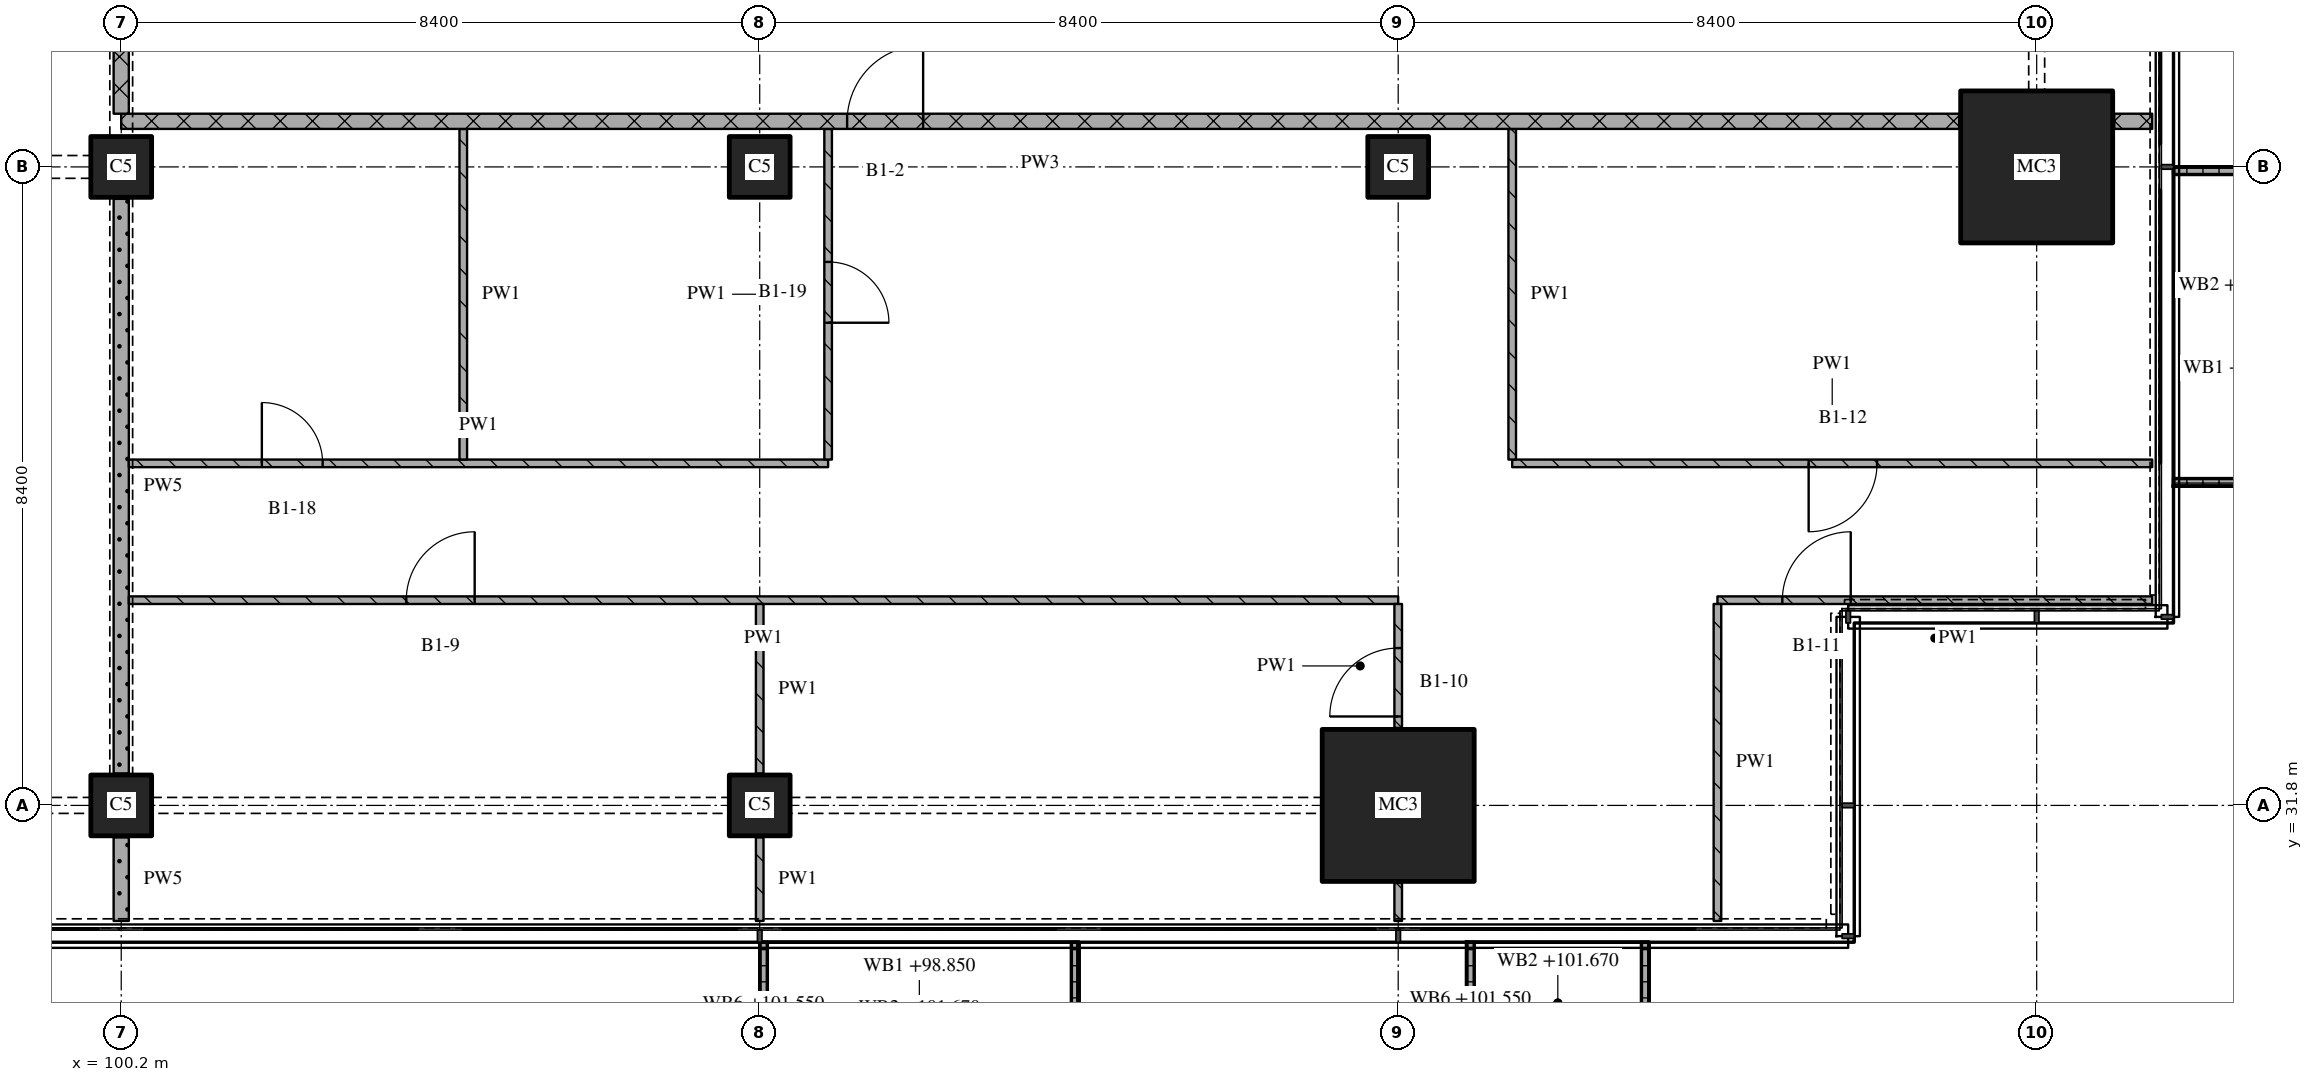
"""IFC4 building model, lengths in metres.
Left out: names, types, materials, properties, quantities, classifications, styles, units other than length and angle.
Written with IfcOpenShell. Run it as: python <this file> out.ifc"""

import sys

from ifc_helpers import new_model, si_unit, direction, frame, frame_2d, origin, origin_2d, place, context, subcontext, project, spatial, polyline, rectangle, outline, extrude, element, fill, save


model = new_model("IFC4")
c1 = context("Model", 3, precision=1e-05, world=origin(), true_north=direction((0.0, 1.0)))
c2 = subcontext(c1, "Body", "Model", "MODEL_VIEW")
j1 = project(units=[si_unit("LENGTHUNIT", "METRE"), si_unit("PLANEANGLEUNIT", "RADIAN")], contexts=[c1])
p1 = place(None, origin())
s1 = spatial("IfcSite", under=j1, at=p1, CompositionType="ELEMENT")
p2 = place(p1, origin())
s2 = spatial("IfcBuilding", under=s1, at=p2, CompositionType="ELEMENT")
p3 = place(p2, frame((0.0, 0.0, 98.85)))
s3 = spatial("IfcBuildingStorey", under=s2, at=p3, CompositionType="ELEMENT", Elevation=98.85)
for number, where, z_axis, x_axis in (
    (1, (100.2, 31.8, 0.0), (0.0, 0.0, 1.0), (1.0, 0.0, 0.0)),
    (2, (100.2, 40.2, 0.0), (0.0, 0.0, 1.0), (1.0, 0.0, 0.0)),
    (3, (108.6, 31.8, 0.0), (0.0, 0.0, 1.0), (1.0, 0.0, 0.0)),
    (4, (108.6, 40.2, 0.0), (0.0, 0.0, 1.0), (1.0, 0.0, 0.0)),
):
    element("IfcColumn", number, at=place(p3, frame(where, z_axis=z_axis, x_axis=x_axis)), inside=s3, PredefinedType="COLUMN", context=c2, shape_type="SweptSolid", body=[
        extrude(rectangle(XDim=0.8, YDim=0.8, at=origin_2d()), origin(), (0.0, 0.0, 1.0), 3.6),
    ])
p4 = place(p3, frame((117.0, 31.8, 0.0), z_axis=(0.0, 0.0, 1.0), x_axis=(1.0, 0.0, 0.0)))
e5 = element("IfcColumn", 5, at=p4, inside=s3, PredefinedType="COLUMN", context=c2, shape_type="SweptSolid", body=[
    extrude(rectangle(XDim=2.0, YDim=2.0, at=origin_2d()), origin(), (0.0, 0.0, 1.0), 3.6),
])
p5 = place(p3, frame((117.0, 40.2, 0.0), z_axis=(0.0, 0.0, 1.0), x_axis=(1.0, 0.0, 0.0)))
e6 = element("IfcColumn", 6, at=p5, inside=s3, PredefinedType="COLUMN", context=c2, shape_type="SweptSolid", body=[
    extrude(rectangle(XDim=0.8, YDim=0.8, at=origin_2d()), origin(), (0.0, 0.0, 1.0), 3.6),
])
p6 = place(p3, frame((125.4, 40.2, 0.0), z_axis=(0.0, 0.0, 1.0), x_axis=(1.0, 0.0, 0.0)))
e7 = element("IfcColumn", 7, at=p6, inside=s3, PredefinedType="COLUMN", context=c2, shape_type="SweptSolid", body=[
    extrude(rectangle(XDim=2.0, YDim=2.0, at=origin_2d()), origin(), (0.0, 0.0, 1.0), 3.6),
])
p7 = place(p3, origin())
e8 = element("IfcWall", 8, at=p7, inside=s3, PredefinedType="SOLIDWALL", context=c2, shape_type="SweptSolid", body=[
    extrude(outline(polyline([(108.6, 30.0), (108.7, 30.0), (108.7, 28.367), (112.7, 28.367), (112.7, 30.0), (112.8, 30.0), (112.8, 28.267), (108.6, 28.267), (108.6, 30.0)])), origin(), (0.0, 0.0, 1.0), 1.0),
])
p8 = place(p3, origin())
e9 = element("IfcWall", 9, at=p8, inside=s3, PredefinedType="SOLIDWALL", context=c2, shape_type="SweptSolid", body=[
    extrude(outline(polyline([(117.9, 30.0), (118.0, 30.0), (118.0, 28.5), (120.2, 28.5), (120.2, 30.0), (120.3, 30.0), (120.3, 28.4), (117.9, 28.4), (117.9, 30.0)])), origin(), (0.0, 0.0, 1.0), 1.0),
])
p9 = place(p3, origin())
e10 = element("IfcWall", 10, at=p9, inside=s3, PredefinedType="SOLIDWALL", context=c2, shape_type="SweptSolid", body=[
    extrude(outline(polyline([(127.2, 36.0), (127.2, 36.1), (128.833, 36.1), (128.833, 40.1), (127.2, 40.1), (127.2, 40.2), (128.933, 40.2), (128.933, 36.0), (127.2, 36.0)])), origin(), (0.0, 0.0, 1.0), 1.0),
])
p10 = place(p3, frame((117.0, 34.5, 0.0), z_axis=(0.0, 0.0, 1.0), x_axis=(-1.0, 0.0, 0.0)))
e11 = element("IfcWall", 11, at=p10, inside=s3, PredefinedType="PARTITIONING", context=c2, shape_type="SweptSolid", body=[
    extrude(rectangle(XDim=16.7, YDim=0.1, at=frame_2d((8.35, 0.0))), origin(), (0.0, 0.0, 1.0), 3.32),
])
p11 = place(p10, frame((12.15, 0.0, 0.0)))
e12 = element("IfcOpeningElement", 12, at=p11, cuts=e11, PredefinedType="OPENING", context=c2, shape_type="SweptSolid", body=[
    extrude(rectangle(XDim=0.9, YDim=2.1, at=frame_2d((0.45, 1.05))), frame((0.0, 0.06, 0.0), z_axis=(0.0, -1.0, 0.0), x_axis=(1.0, 0.0, 0.0)), (0.0, 0.0, 1.0), 0.12),
])
p12 = place(p3, frame((126.92, 34.5, 0.0), z_axis=(0.0, 0.0, 1.0), x_axis=(-1.0, 0.0, 0.0)))
e13 = element("IfcWall", 13, at=p12, inside=s3, PredefinedType="PARTITIONING", context=c2, shape_type="SweptSolid", body=[
    extrude(rectangle(XDim=5.72, YDim=0.1, at=frame_2d((2.86, 0.0))), origin(), (0.0, 0.0, 1.0), 3.32),
])
p13 = place(p12, frame((3.966, 0.0, 0.0)))
e14 = element("IfcOpeningElement", 14, at=p13, cuts=e13, PredefinedType="OPENING", context=c2, shape_type="SweptSolid", body=[
    extrude(rectangle(XDim=0.9, YDim=2.1, at=frame_2d((0.45, 1.05))), frame((0.0, 0.06, 0.0), z_axis=(0.0, -1.0, 0.0), x_axis=(1.0, 0.0, 0.0)), (0.0, 0.0, 1.0), 0.12),
])
p14 = place(p3, frame((100.3, 36.3, 0.0), z_axis=(0.0, 0.0, 1.0), x_axis=(1.0, 0.0, 0.0)))
e15 = element("IfcWall", 15, at=p14, inside=s3, PredefinedType="PARTITIONING", context=c2, shape_type="SweptSolid", body=[
    extrude(rectangle(XDim=9.2, YDim=0.1, at=frame_2d((4.6, 0.0))), origin(), (0.0, 0.0, 1.0), 3.32),
])
p15 = place(p14, frame((1.75, 0.0, 0.0)))
e16 = element("IfcOpeningElement", 16, at=p15, cuts=e15, PredefinedType="OPENING", context=c2, shape_type="SweptSolid", body=[
    extrude(rectangle(XDim=0.8, YDim=2.1, at=frame_2d((0.4, 1.05))), frame((0.0, 0.06, 0.0), z_axis=(0.0, -1.0, 0.0), x_axis=(1.0, 0.0, 0.0)), (0.0, 0.0, 1.0), 0.12),
])
p16 = place(p3, frame((118.5, 36.3, 0.0), z_axis=(0.0, 0.0, 1.0), x_axis=(1.0, 0.0, 0.0)))
e17 = element("IfcWall", 17, at=p16, inside=s3, PredefinedType="PARTITIONING", context=c2, shape_type="SweptSolid", body=[
    extrude(rectangle(XDim=8.42, YDim=0.1, at=frame_2d((4.21, 0.0))), origin(), (0.0, 0.0, 1.0), 3.32),
])
p17 = place(p16, frame((3.9, 0.0, 0.0)))
e18 = element("IfcOpeningElement", 18, at=p17, cuts=e17, PredefinedType="OPENING", context=c2, shape_type="SweptSolid", body=[
    extrude(rectangle(XDim=0.9, YDim=2.1, at=frame_2d((0.45, 1.05))), frame((0.0, 0.06, 0.0), z_axis=(0.0, -1.0, 0.0), x_axis=(1.0, 0.0, 0.0)), (0.0, 0.0, 1.0), 0.12),
])
p18 = place(p3, frame((124.38, 40.8, 0.0), z_axis=(0.0, 0.0, 1.0), x_axis=(-1.0, 0.0, 0.0)))
e19 = element("IfcWall", 19, at=p18, inside=s3, PredefinedType="PARTITIONING", context=c2, shape_type="SweptSolid", body=[
    extrude(rectangle(XDim=24.18, YDim=0.2, at=frame_2d((12.09, 0.0))), origin(), (0.0, 0.0, 1.0), 3.32),
])
p19 = place(p18, frame((13.63, 0.0, 0.0)))
e20 = element("IfcOpeningElement", 20, at=p19, cuts=e19, PredefinedType="OPENING", context=c2, shape_type="SweptSolid", body=[
    extrude(rectangle(XDim=1.0, YDim=2.1, at=frame_2d((0.5, 1.05))), frame((0.0, 0.11, 0.0), z_axis=(0.0, -1.0, 0.0), x_axis=(1.0, 0.0, 0.0)), (0.0, 0.0, 1.0), 0.22),
])
p20 = place(p3, frame((126.42, 40.8, 0.0), z_axis=(0.0, 0.0, 1.0), x_axis=(1.0, 0.0, 0.0)))
e21 = element("IfcWall", 21, at=p20, inside=s3, PredefinedType="PARTITIONING", context=c2, shape_type="SweptSolid", body=[
    extrude(rectangle(XDim=0.5, YDim=0.2, at=frame_2d((0.25, 0.0))), origin(), (0.0, 0.0, 1.0), 3.32),
])
p21 = place(p3, frame((100.2, 43.1, 0.0), z_axis=(0.0, 0.0, 1.0), x_axis=(0.0, -1.0, 0.0)))
e22 = element("IfcWall", 22, at=p21, inside=s3, PredefinedType="PARTITIONING", context=c2, shape_type="SweptSolid", body=[
    extrude(rectangle(XDim=2.2, YDim=0.2, at=frame_2d((1.1, 0.0))), origin(), (0.0, 0.0, 1.0), 2.43),
])
p22 = place(p3, frame((100.2, 31.38, 0.0), z_axis=(0.0, 0.0, 1.0), x_axis=(0.0, -1.0, 0.0)))
e23 = element("IfcWall", 23, at=p22, inside=s3, PredefinedType="PARTITIONING", context=c2, shape_type="SweptSolid", body=[
    extrude(rectangle(XDim=1.1, YDim=0.2, at=frame_2d((0.55, 0.0))), origin(), (0.0, 0.0, 1.0), 3.32),
])
p23 = place(p3, frame((100.2, 39.78, 0.0), z_axis=(0.0, 0.0, 1.0), x_axis=(0.0, -1.0, 0.0)))
e24 = element("IfcWall", 24, at=p23, inside=s3, PredefinedType="PARTITIONING", context=c2, shape_type="SweptSolid", body=[
    extrude(rectangle(XDim=7.56, YDim=0.2, at=frame_2d((3.78, 0.0))), origin(), (0.0, 0.0, 1.0), 2.83),
])
p24 = place(p3, frame((104.7, 40.7, 0.0), z_axis=(0.0, 0.0, 1.0), x_axis=(0.0, -1.0, 0.0)))
e25 = element("IfcWall", 25, at=p24, inside=s3, PredefinedType="PARTITIONING", context=c2, shape_type="SweptSolid", body=[
    extrude(rectangle(XDim=4.35, YDim=0.1, at=frame_2d((2.175, 0.0))), origin(), (0.0, 0.0, 1.0), 3.32),
])
p25 = place(p3, frame((108.6, 31.38, 0.0), z_axis=(0.0, 0.0, 1.0), x_axis=(0.0, -1.0, 0.0)))
e26 = element("IfcWall", 26, at=p25, inside=s3, PredefinedType="PARTITIONING", context=c2, shape_type="SweptSolid", body=[
    extrude(rectangle(XDim=1.1, YDim=0.1, at=frame_2d((0.55, 0.0))), origin(), (0.0, 0.0, 1.0), 3.32),
])
p26 = place(p3, frame((108.6, 34.45, 0.0), z_axis=(0.0, 0.0, 1.0), x_axis=(0.0, -1.0, 0.0)))
e27 = element("IfcWall", 27, at=p26, inside=s3, PredefinedType="PARTITIONING", context=c2, shape_type="SweptSolid", body=[
    extrude(rectangle(XDim=2.23, YDim=0.1, at=frame_2d((1.115, 0.0))), origin(), (0.0, 0.0, 1.0), 3.32),
])
p27 = place(p3, frame((109.5, 36.35, 0.0), z_axis=(0.0, 0.0, 1.0), x_axis=(0.0, 1.0, 0.0)))
e28 = element("IfcWall", 28, at=p27, inside=s3, PredefinedType="PARTITIONING", context=c2, shape_type="SweptSolid", body=[
    extrude(rectangle(XDim=4.35, YDim=0.1, at=frame_2d((2.175, 0.0))), origin(), (0.0, 0.0, 1.0), 3.32),
])
p28 = place(p27, frame((1.8, 0.0, 0.0)))
e29 = element("IfcOpeningElement", 29, at=p28, cuts=e28, PredefinedType="OPENING", context=c2, shape_type="SweptSolid", body=[
    extrude(rectangle(XDim=0.8, YDim=2.1, at=frame_2d((0.4, 1.05))), frame((0.0, 0.06, 0.0), z_axis=(0.0, -1.0, 0.0), x_axis=(1.0, 0.0, 0.0)), (0.0, 0.0, 1.0), 0.12),
])
p29 = place(p3, frame((117.0, 30.78, 0.0), z_axis=(0.0, 0.0, 1.0), x_axis=(0.0, -1.0, 0.0)))
e30 = element("IfcWall", 30, at=p29, inside=s3, PredefinedType="PARTITIONING", context=c2, shape_type="SweptSolid", body=[
    extrude(rectangle(XDim=0.5, YDim=0.1, at=frame_2d((0.25, 0.0))), origin(), (0.0, 0.0, 1.0), 3.32),
])
p30 = place(p3, frame((117.0, 32.82, 0.0), z_axis=(0.0, 0.0, 1.0), x_axis=(0.0, 1.0, 0.0)))
e31 = element("IfcWall", 31, at=p30, inside=s3, PredefinedType="PARTITIONING", context=c2, shape_type="SweptSolid", body=[
    extrude(rectangle(XDim=1.63, YDim=0.1, at=frame_2d((0.815, 0.0))), origin(), (0.0, 0.0, 1.0), 3.32),
])
p31 = place(p30, frame((0.15, 0.0, 0.0)))
e32 = element("IfcOpeningElement", 32, at=p31, cuts=e31, PredefinedType="OPENING", context=c2, shape_type="SweptSolid", body=[
    extrude(rectangle(XDim=0.9, YDim=2.1, at=frame_2d((0.45, 1.05))), frame((0.0, 0.06, 0.0), z_axis=(0.0, -1.0, 0.0), x_axis=(1.0, 0.0, 0.0)), (0.0, 0.0, 1.0), 0.12),
])
p32 = place(p3, frame((118.5, 40.7, 0.0), z_axis=(0.0, 0.0, 1.0), x_axis=(0.0, -1.0, 0.0)))
e33 = element("IfcWall", 33, at=p32, inside=s3, PredefinedType="PARTITIONING", context=c2, shape_type="SweptSolid", body=[
    extrude(rectangle(XDim=4.35, YDim=0.1, at=frame_2d((2.175, 0.0))), origin(), (0.0, 0.0, 1.0), 3.32),
])
p33 = place(p3, frame((121.2, 34.45, 0.0), z_axis=(0.0, 0.0, 1.0), x_axis=(0.0, -1.0, 0.0)))
e34 = element("IfcWall", 34, at=p33, inside=s3, PredefinedType="PARTITIONING", context=c2, shape_type="SweptSolid", body=[
    extrude(rectangle(XDim=4.17, YDim=0.1, at=frame_2d((2.085, 0.0))), origin(), (0.0, 0.0, 1.0), 3.32),
])
p34 = place(p11, origin())
e35 = element("IfcDoor", 35, at=p34, inside=s3, OperationType="SINGLE_SWING_RIGHT", PredefinedType="DOOR", context=c2, shape_type="SweptSolid", body=[
    extrude(rectangle(XDim=0.9, YDim=2.1, at=frame_2d((0.45, 1.05))), frame((0.0, 0.025, 0.0), z_axis=(0.0, -1.0, 0.0), x_axis=(1.0, 0.0, 0.0)), (0.0, 0.0, 1.0), 0.05),
])
fill(e12, e35)
p35 = place(p13, origin())
e36 = element("IfcDoor", 36, at=p35, inside=s3, OperationType="SINGLE_SWING_RIGHT", PredefinedType="DOOR", context=c2, shape_type="SweptSolid", body=[
    extrude(rectangle(XDim=0.9, YDim=2.1, at=frame_2d((0.45, 1.05))), frame((0.0, 0.025, 0.0), z_axis=(0.0, -1.0, 0.0), x_axis=(1.0, 0.0, 0.0)), (0.0, 0.0, 1.0), 0.05),
])
fill(e14, e36)
p36 = place(p15, origin())
e37 = element("IfcDoor", 37, at=p36, inside=s3, OperationType="SINGLE_SWING_LEFT", PredefinedType="DOOR", context=c2, shape_type="SweptSolid", body=[
    extrude(rectangle(XDim=0.8, YDim=2.1, at=frame_2d((0.4, 1.05))), frame((0.0, 0.025, 0.0), z_axis=(0.0, -1.0, 0.0), x_axis=(1.0, 0.0, 0.0)), (0.0, 0.0, 1.0), 0.05),
])
fill(e16, e37)
p37 = place(p17, origin())
e38 = element("IfcDoor", 38, at=p37, inside=s3, OperationType="SINGLE_SWING_RIGHT", PredefinedType="DOOR", context=c2, shape_type="SweptSolid", body=[
    extrude(rectangle(XDim=0.9, YDim=2.1, at=frame_2d((0.45, 1.05))), frame((0.0, 0.025, 0.0), z_axis=(0.0, -1.0, 0.0), x_axis=(1.0, 0.0, 0.0)), (0.0, 0.0, 1.0), 0.05),
])
fill(e18, e38)
p38 = place(p19, origin())
e39 = element("IfcDoor", 39, at=p38, inside=s3, OperationType="SINGLE_SWING_RIGHT", PredefinedType="DOOR", context=c2, shape_type="SweptSolid", body=[
    extrude(rectangle(XDim=1.0, YDim=2.1, at=frame_2d((0.5, 1.05))), frame((0.0, 0.025, 0.0), z_axis=(0.0, -1.0, 0.0), x_axis=(1.0, 0.0, 0.0)), (0.0, 0.0, 1.0), 0.05),
])
fill(e20, e39)
p39 = place(p28, origin())
e40 = element("IfcDoor", 40, at=p39, inside=s3, OperationType="SINGLE_SWING_RIGHT", PredefinedType="DOOR", context=c2, shape_type="SweptSolid", body=[
    extrude(rectangle(XDim=0.8, YDim=2.1, at=frame_2d((0.4, 1.05))), frame((0.0, 0.025, 0.0), z_axis=(0.0, -1.0, 0.0), x_axis=(1.0, 0.0, 0.0)), (0.0, 0.0, 1.0), 0.05),
])
fill(e29, e40)
p40 = place(p31, origin())
e41 = element("IfcDoor", 41, at=p40, inside=s3, OperationType="SINGLE_SWING_LEFT", PredefinedType="DOOR", context=c2, shape_type="SweptSolid", body=[
    extrude(rectangle(XDim=0.9, YDim=2.1, at=frame_2d((0.45, 1.05))), frame((0.0, 0.025, 0.0), z_axis=(0.0, -1.0, 0.0), x_axis=(1.0, 0.0, 0.0)), (0.0, 0.0, 1.0), 0.05),
])
fill(e32, e41)
save(model, sys.argv[1])
